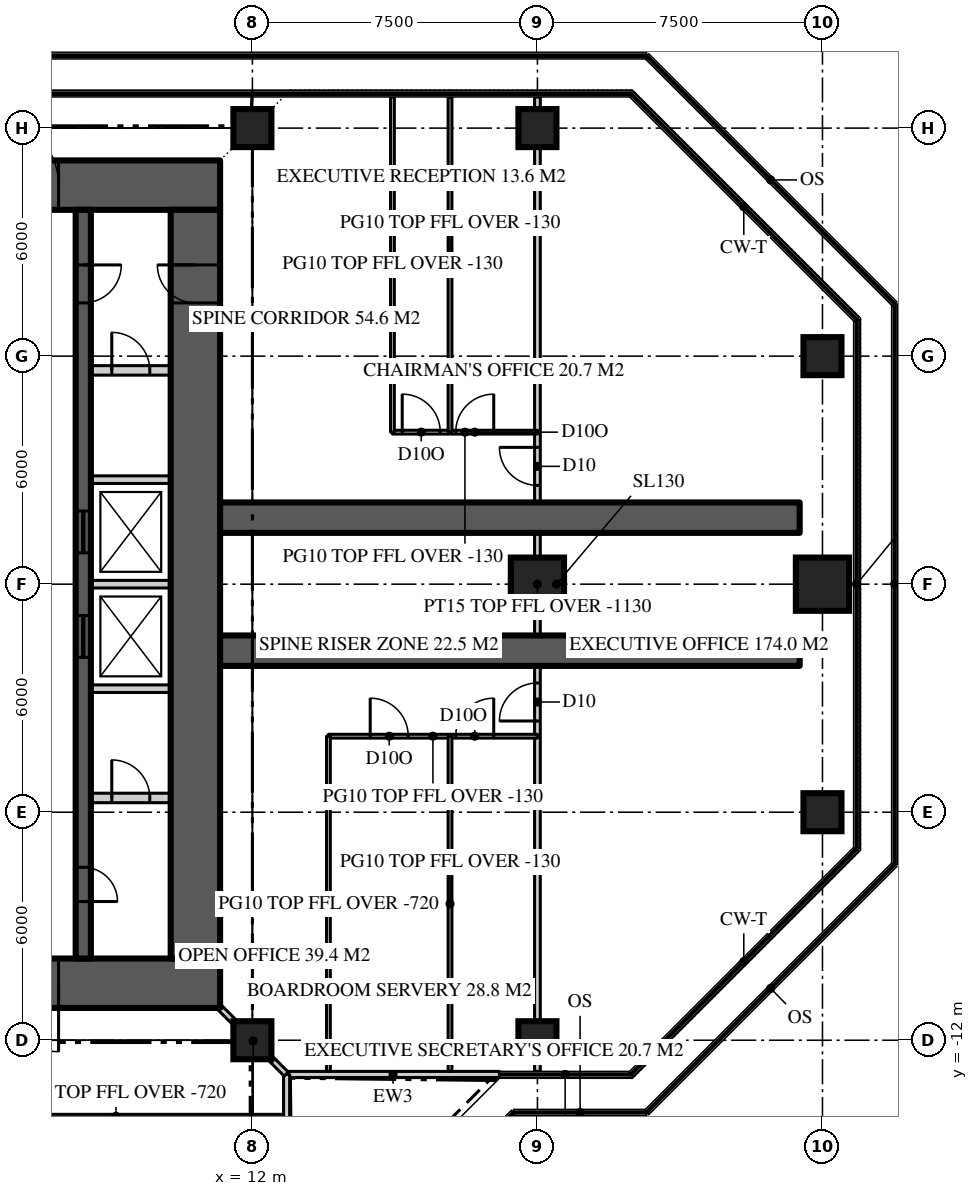
"""IFC4 building model, lengths in metres.
Left out: names, types, materials, properties, quantities, classifications, styles, units other than length and angle.
Written with IfcOpenShell. Run it as: python <this file> out.ifc"""

import sys

from ifc_helpers import new_model, si_unit, direction, frame, frame_2d, origin, origin_2d, place, context, subcontext, project, spatial, rectangle, extrude, element, fill, save


model = new_model("IFC4")
c1 = context("Model", 3, precision=1e-05, world=origin(), true_north=direction((0.0, 1.0)))
c2 = subcontext(c1, "Body", "Model", "MODEL_VIEW")
j1 = project(units=[si_unit("LENGTHUNIT", "METRE"), si_unit("PLANEANGLEUNIT", "RADIAN")], contexts=[c1])
p1 = place(None, origin())
s1 = spatial("IfcSite", under=j1, at=p1, CompositionType="ELEMENT")
p2 = place(p1, origin())
s2 = spatial("IfcBuilding", under=s1, at=p2, CompositionType="ELEMENT")
p3 = place(p2, frame((0.0, 0.0, 290.7)))
s3 = spatial("IfcBuildingStorey", under=s2, at=p3, CompositionType="ELEMENT", Elevation=290.7)
p4 = place(p3, frame((-11.15, 10.5, 0.0), z_axis=(0.0, 0.0, 1.0), x_axis=(1.0, 0.0, 0.0)))
e1 = element("IfcWall", 1, at=p4, inside=s3, PredefinedType="SHEAR", context=c2, shape_type="SweptSolid", body=[
    extrude(rectangle(XDim=22.3, YDim=1.3, at=frame_2d((11.15, 0.0))), origin(), (0.0, 0.0, 1.0), 3.9),
])
p5 = place(p4, frame((4.25, 0.0, 0.0)))
e2 = element("IfcOpeningElement", 2, at=p5, cuts=e1, PredefinedType="OPENING", context=c2, shape_type="SweptSolid", body=[
    extrude(rectangle(XDim=1.8, YDim=2.2, at=frame_2d((0.9, 1.1))), frame((0.0, 0.66, 0.0), z_axis=(0.0, -1.0, 0.0), x_axis=(1.0, 0.0, 0.0)), (0.0, 0.0, 1.0), 1.32),
])
p6 = place(p4, frame((16.25, 0.0, 0.0)))
e3 = element("IfcOpeningElement", 3, at=p6, cuts=e1, PredefinedType="OPENING", context=c2, shape_type="SweptSolid", body=[
    extrude(rectangle(XDim=1.8, YDim=2.2, at=frame_2d((0.9, 1.1))), frame((0.0, 0.66, 0.0), z_axis=(0.0, -1.0, 0.0), x_axis=(1.0, 0.0, 0.0)), (0.0, 0.0, 1.0), 1.32),
])
p7 = place(p3, frame((11.15, -10.5, 0.0), z_axis=(0.0, 0.0, 1.0), x_axis=(-1.0, 0.0, 0.0)))
e4 = element("IfcWall", 4, at=p7, inside=s3, PredefinedType="SHEAR", context=c2, shape_type="SweptSolid", body=[
    extrude(rectangle(XDim=22.3, YDim=1.3, at=frame_2d((11.15, 0.0))), origin(), (0.0, 0.0, 1.0), 3.9),
])
p8 = place(p7, frame((16.25, 0.0, 0.0)))
e5 = element("IfcOpeningElement", 5, at=p8, cuts=e4, PredefinedType="OPENING", context=c2, shape_type="SweptSolid", body=[
    extrude(rectangle(XDim=1.8, YDim=2.2, at=frame_2d((0.9, 1.1))), frame((0.0, 0.66, 0.0), z_axis=(0.0, -1.0, 0.0), x_axis=(1.0, 0.0, 0.0)), (0.0, 0.0, 1.0), 1.32),
])
p9 = place(p7, frame((4.25, 0.0, 0.0)))
e6 = element("IfcOpeningElement", 6, at=p9, cuts=e4, PredefinedType="OPENING", context=c2, shape_type="SweptSolid", body=[
    extrude(rectangle(XDim=1.8, YDim=2.2, at=frame_2d((0.9, 1.1))), frame((0.0, 0.66, 0.0), z_axis=(0.0, -1.0, 0.0), x_axis=(1.0, 0.0, 0.0)), (0.0, 0.0, 1.0), 1.32),
])
p10 = place(p3, frame((10.5, -9.85, 0.0), z_axis=(0.0, 0.0, 1.0), x_axis=(0.0, 1.0, 0.0)))
e7 = element("IfcWall", 7, at=p10, inside=s3, PredefinedType="SHEAR", context=c2, shape_type="SweptSolid", body=[
    extrude(rectangle(XDim=19.7, YDim=1.3, at=frame_2d((9.85, 0.0))), origin(), (0.0, 0.0, 1.0), 3.9),
])
p11 = place(p10, frame((17.25, 0.0, 0.0)))
e8 = element("IfcOpeningElement", 8, at=p11, cuts=e7, PredefinedType="OPENING", context=c2, shape_type="SweptSolid", body=[
    extrude(rectangle(XDim=1.0, YDim=2.2, at=frame_2d((0.5, 1.1))), frame((0.0, 0.66, 0.0), z_axis=(0.0, -1.0, 0.0), x_axis=(1.0, 0.0, 0.0)), (0.0, 0.0, 1.0), 1.32),
])
for number, where, z_axis, x_axis in (
    (9, (11.15, -1.75, 0.0), (0.0, 0.0, 1.0), (1.0, 0.0, 0.0)),
    (10, (11.15, 1.75, 0.0), (0.0, 0.0, 1.0), (1.0, 0.0, 0.0)),
):
    element("IfcWall", number, at=place(p3, frame(where, z_axis=z_axis, x_axis=x_axis)), inside=s3, PredefinedType="SHEAR", context=c2, shape_type="SweptSolid", body=[
        extrude(rectangle(XDim=15.25, YDim=0.8, at=frame_2d((7.625, 0.0))), origin(), (0.0, 0.0, 1.0), 3.9),
    ])
for number, where, z_axis, x_axis in (
    (11, (12.0, -12.0, 0.0), (0.0, 0.0, 1.0), (1.0, 0.0, 0.0)),
    (12, (19.5, -12.0, 0.0), (0.0, 0.0, 1.0), (1.0, 0.0, 0.0)),
    (13, (27.0, -6.0, 0.0), (0.0, 0.0, 1.0), (1.0, 0.0, 0.0)),
):
    element("IfcColumn", number, at=place(p3, frame(where, z_axis=z_axis, x_axis=x_axis)), inside=s3, PredefinedType="COLUMN", context=c2, shape_type="SweptSolid", body=[
        extrude(rectangle(XDim=1.0, YDim=1.0, at=origin_2d()), origin(), (0.0, 0.0, 1.0), 3.9),
    ])
for number, where, z_axis, x_axis in (
    (14, (19.5, 0.0, 0.0), (0.0, 0.0, 1.0), (1.0, 0.0, 0.0)),
    (15, (27.0, 0.0, 0.0), (0.0, 0.0, 1.0), (1.0, 0.0, 0.0)),
):
    element("IfcColumn", number, at=place(p3, frame(where, z_axis=z_axis, x_axis=x_axis)), inside=s3, PredefinedType="COLUMN", context=c2, shape_type="SweptSolid", body=[
        extrude(rectangle(XDim=1.4, YDim=1.4, at=origin_2d()), origin(), (0.0, 0.0, 1.0), 3.9),
    ])
for number, where, z_axis, x_axis in (
    (16, (27.0, 6.0, 0.0), (0.0, 0.0, 1.0), (1.0, 0.0, 0.0)),
    (17, (12.0, 12.0, 0.0), (0.0, 0.0, 1.0), (1.0, 0.0, 0.0)),
    (18, (19.5, 12.0, 0.0), (0.0, 0.0, 1.0), (1.0, 0.0, 0.0)),
):
    element("IfcColumn", number, at=place(p3, frame(where, z_axis=z_axis, x_axis=x_axis)), inside=s3, PredefinedType="COLUMN", context=c2, shape_type="SweptSolid", body=[
        extrude(rectangle(XDim=1.0, YDim=1.0, at=origin_2d()), origin(), (0.0, 0.0, 1.0), 3.9),
    ])
p12 = place(p3, frame((12.9, -12.9, 0.0), z_axis=(0.0, 0.0, 1.0), x_axis=(1.0, 0.0, 0.0)))
e19 = element("IfcWall", 19, at=p12, inside=s3, PredefinedType="SOLIDWALL", context=c2, shape_type="SweptSolid", body=[
    extrude(rectangle(XDim=5.6, YDim=0.16, at=frame_2d((2.8, 0.0))), origin(), (0.0, 0.0, 1.0), 3.77),
])
p13 = place(p3, frame((12.9, -18.5, 0.0), z_axis=(0.0, 0.0, 1.0), x_axis=(0.0, 1.0, 0.0)))
e20 = element("IfcWall", 20, at=p13, inside=s3, PredefinedType="SOLIDWALL", context=c2, shape_type="SweptSolid", body=[
    extrude(rectangle(XDim=5.6, YDim=0.16, at=frame_2d((2.8, 0.0))), origin(), (0.0, 0.0, 1.0), 3.77),
])
p14 = place(p13, frame((2.3, 0.0, 0.0)))
e21 = element("IfcOpeningElement", 21, at=p14, cuts=e20, PredefinedType="OPENING", context=c2, shape_type="SweptSolid", body=[
    extrude(rectangle(XDim=1.0, YDim=2.2, at=frame_2d((0.5, 1.1))), frame((0.0, 0.09, 0.0), z_axis=(0.0, -1.0, 0.0), x_axis=(1.0, 0.0, 0.0)), (0.0, 0.0, 1.0), 0.18),
])
p15 = place(p3, frame((7.55, 9.85, 0.0), z_axis=(0.0, 0.0, 1.0), x_axis=(0.0, -1.0, 0.0)))
e22 = element("IfcWall", 22, at=p15, inside=s3, PredefinedType="SHEAR", context=c2, shape_type="SweptSolid", body=[
    extrude(rectangle(XDim=19.7, YDim=0.4, at=frame_2d((9.85, 0.0))), origin(), (0.0, 0.0, 1.0), 3.9),
])
p16 = place(p15, frame((1.45, 0.0, 0.0)))
e23 = element("IfcOpeningElement", 23, at=p16, cuts=e22, PredefinedType="OPENING", context=c2, shape_type="SweptSolid", body=[
    extrude(rectangle(XDim=1.0, YDim=2.2, at=frame_2d((0.5, 1.1))), frame((0.0, 0.21, 0.0), z_axis=(0.0, -1.0, 0.0), x_axis=(1.0, 0.0, 0.0)), (0.0, 0.0, 1.0), 0.42),
])
p17 = place(p15, frame((17.3, 0.0, 0.0)))
e24 = element("IfcOpeningElement", 24, at=p17, cuts=e22, PredefinedType="OPENING", context=c2, shape_type="SweptSolid", body=[
    extrude(rectangle(XDim=0.9, YDim=2.1, at=frame_2d((0.45, 1.05))), frame((0.0, 0.21, 0.0), z_axis=(0.0, -1.0, 0.0), x_axis=(1.0, 0.0, 0.0)), (0.0, 0.0, 1.0), 0.42),
])
p18 = place(p15, frame((7.925, 0.0, 0.0)))
e25 = element("IfcOpeningElement", 25, at=p18, cuts=e22, PredefinedType="OPENING", context=c2, shape_type="SweptSolid", body=[
    extrude(rectangle(XDim=1.1, YDim=2.2, at=frame_2d((0.55, 1.1))), frame((0.0, 0.21, 0.0), z_axis=(0.0, -1.0, 0.0), x_axis=(1.0, 0.0, 0.0)), (0.0, 0.0, 1.0), 0.42),
])
p19 = place(p15, frame((10.675, 0.0, 0.0)))
e26 = element("IfcOpeningElement", 26, at=p19, cuts=e22, PredefinedType="OPENING", context=c2, shape_type="SweptSolid", body=[
    extrude(rectangle(XDim=1.1, YDim=2.2, at=frame_2d((0.55, 1.1))), frame((0.0, 0.21, 0.0), z_axis=(0.0, -1.0, 0.0), x_axis=(1.0, 0.0, 0.0)), (0.0, 0.0, 1.0), 0.42),
])
p20 = place(p3, frame((7.75, 5.625, 0.0), z_axis=(0.0, 0.0, 1.0), x_axis=(1.0, 0.0, 0.0)))
e27 = element("IfcWall", 27, at=p20, inside=s3, PredefinedType="SOLIDWALL", context=c2, shape_type="SweptSolid", body=[
    extrude(rectangle(XDim=2.1, YDim=0.25, at=frame_2d((1.05, 0.0))), origin(), (0.0, 0.0, 1.0), 3.7),
])
p21 = place(p20, frame((0.55, 0.0, 0.0)))
e28 = element("IfcOpeningElement", 28, at=p21, cuts=e27, PredefinedType="OPENING", context=c2, shape_type="SweptSolid", body=[
    extrude(rectangle(XDim=1.0, YDim=2.2, at=frame_2d((0.5, 1.1))), frame((0.0, 0.135, 0.0), z_axis=(0.0, -1.0, 0.0), x_axis=(1.0, 0.0, 0.0)), (0.0, 0.0, 1.0), 0.27),
])
p22 = place(p3, frame((7.75, -5.625, 0.0), z_axis=(0.0, 0.0, 1.0), x_axis=(1.0, 0.0, 0.0)))
e29 = element("IfcWall", 29, at=p22, inside=s3, PredefinedType="SOLIDWALL", context=c2, shape_type="SweptSolid", body=[
    extrude(rectangle(XDim=2.1, YDim=0.25, at=frame_2d((1.05, 0.0))), origin(), (0.0, 0.0, 1.0), 3.7),
])
p23 = place(p22, frame((0.55, 0.0, 0.0)))
e30 = element("IfcOpeningElement", 30, at=p23, cuts=e29, PredefinedType="OPENING", context=c2, shape_type="SweptSolid", body=[
    extrude(rectangle(XDim=1.0, YDim=2.2, at=frame_2d((0.5, 1.1))), frame((0.0, 0.135, 0.0), z_axis=(0.0, -1.0, 0.0), x_axis=(1.0, 0.0, 0.0)), (0.0, 0.0, 1.0), 0.27),
])
for number, where, z_axis, x_axis in (
    (31, (7.75, -2.75, 0.0), (0.0, 0.0, 1.0), (1.0, 0.0, 0.0)),
    (32, (7.75, 0.0, 0.0), (0.0, 0.0, 1.0), (1.0, 0.0, 0.0)),
    (33, (7.75, 2.75, 0.0), (0.0, 0.0, 1.0), (1.0, 0.0, 0.0)),
):
    element("IfcWall", number, at=place(p3, frame(where, z_axis=z_axis, x_axis=x_axis)), inside=s3, PredefinedType="SOLIDWALL", context=c2, shape_type="SweptSolid", body=[
        extrude(rectangle(XDim=2.1, YDim=0.2, at=frame_2d((1.05, 0.0))), origin(), (0.0, 0.0, 1.0), 3.7),
    ])
p24 = place(p3, frame((19.5, -12.82, 0.0), z_axis=(0.0, 0.0, 1.0), x_axis=(0.0, 1.0, 0.0)))
e34 = element("IfcWall", 34, at=p24, inside=s3, PredefinedType="PARTITIONING", context=c2, shape_type="SweptSolid", body=[
    extrude(rectangle(XDim=25.64, YDim=0.15, at=frame_2d((12.82, 0.0))), origin(), (0.0, 0.0, 1.0), 2.77),
])
p25 = place(p24, frame((15.42, 0.0, 0.0)))
e35 = element("IfcOpeningElement", 35, at=p25, cuts=e34, PredefinedType="OPENING", context=c2, shape_type="SweptSolid", body=[
    extrude(rectangle(XDim=1.0, YDim=2.2, at=frame_2d((0.5, 1.1))), frame((0.0, 0.085, 0.0), z_axis=(0.0, -1.0, 0.0), x_axis=(1.0, 0.0, 0.0)), (0.0, 0.0, 1.0), 0.17),
])
p26 = place(p24, frame((9.22, 0.0, 0.0)))
e36 = element("IfcOpeningElement", 36, at=p26, cuts=e34, PredefinedType="OPENING", context=c2, shape_type="SweptSolid", body=[
    extrude(rectangle(XDim=1.0, YDim=2.2, at=frame_2d((0.5, 1.1))), frame((0.0, 0.085, 0.0), z_axis=(0.0, -1.0, 0.0), x_axis=(1.0, 0.0, 0.0)), (0.0, 0.0, 1.0), 0.17),
])
p27 = place(p3, frame((15.685, 4.0, 0.0), z_axis=(0.0, 0.0, 1.0), x_axis=(1.0, 0.0, 0.0)))
e37 = element("IfcWall", 37, at=p27, inside=s3, PredefinedType="PARTITIONING", context=c2, shape_type="SweptSolid", body=[
    extrude(rectangle(XDim=3.815, YDim=0.1, at=frame_2d((1.907, 0.0))), origin(), (0.0, 0.0, 1.0), 3.77),
])
p28 = place(p27, frame((0.258, 0.0, 0.0)))
e38 = element("IfcOpeningElement", 38, at=p28, cuts=e37, PredefinedType="OPENING", context=c2, shape_type="SweptSolid", body=[
    extrude(rectangle(XDim=1.0, YDim=2.2, at=frame_2d((0.5, 1.1))), frame((0.0, 0.06, 0.0), z_axis=(0.0, -1.0, 0.0), x_axis=(1.0, 0.0, 0.0)), (0.0, 0.0, 1.0), 0.12),
])
p29 = place(p27, frame((1.665, 0.0, 0.0)))
e39 = element("IfcOpeningElement", 39, at=p29, cuts=e37, PredefinedType="OPENING", context=c2, shape_type="SweptSolid", body=[
    extrude(rectangle(XDim=1.0, YDim=2.2, at=frame_2d((0.5, 1.1))), frame((0.0, 0.06, 0.0), z_axis=(0.0, -1.0, 0.0), x_axis=(1.0, 0.0, 0.0)), (0.0, 0.0, 1.0), 0.12),
])
for number, where, z_axis, x_axis in (
    (40, (15.685, 4.0, 0.0), (0.0, 0.0, 1.0), (0.0, 1.0, 0.0)),
    (41, (17.2, 4.0, 0.0), (0.0, 0.0, 1.0), (0.0, 1.0, 0.0)),
):
    element("IfcWall", number, at=place(p3, frame(where, z_axis=z_axis, x_axis=x_axis)), inside=s3, PredefinedType="PARTITIONING", context=c2, shape_type="SweptSolid", body=[
        extrude(rectangle(XDim=8.82, YDim=0.1, at=frame_2d((4.41, 0.0))), origin(), (0.0, 0.0, 1.0), 3.77),
    ])
p30 = place(p3, frame((14.0, -4.0, 0.0), z_axis=(0.0, 0.0, 1.0), x_axis=(1.0, 0.0, 0.0)))
e42 = element("IfcWall", 42, at=p30, inside=s3, PredefinedType="PARTITIONING", context=c2, shape_type="SweptSolid", body=[
    extrude(rectangle(XDim=5.5, YDim=0.1, at=frame_2d((2.75, 0.0))), origin(), (0.0, 0.0, 1.0), 3.77),
])
p31 = place(p30, frame((1.1, 0.0, 0.0)))
e43 = element("IfcOpeningElement", 43, at=p31, cuts=e42, PredefinedType="OPENING", context=c2, shape_type="SweptSolid", body=[
    extrude(rectangle(XDim=1.0, YDim=2.2, at=frame_2d((0.5, 1.1))), frame((0.0, 0.06, 0.0), z_axis=(0.0, -1.0, 0.0), x_axis=(1.0, 0.0, 0.0)), (0.0, 0.0, 1.0), 0.12),
])
p32 = place(p30, frame((3.35, 0.0, 0.0)))
e44 = element("IfcOpeningElement", 44, at=p32, cuts=e42, PredefinedType="OPENING", context=c2, shape_type="SweptSolid", body=[
    extrude(rectangle(XDim=1.0, YDim=2.2, at=frame_2d((0.5, 1.1))), frame((0.0, 0.06, 0.0), z_axis=(0.0, -1.0, 0.0), x_axis=(1.0, 0.0, 0.0)), (0.0, 0.0, 1.0), 0.12),
])
p33 = place(p3, frame((14.0, -4.0, 0.0), z_axis=(0.0, 0.0, 1.0), x_axis=(0.0, -1.0, 0.0)))
e45 = element("IfcWall", 45, at=p33, inside=s3, PredefinedType="PARTITIONING", context=c2, shape_type="SweptSolid", body=[
    extrude(rectangle(XDim=8.82, YDim=0.1, at=frame_2d((4.41, 0.0))), origin(), (0.0, 0.0, 1.0), 3.18),
])
p34 = place(p3, frame((17.2, -4.0, 0.0), z_axis=(0.0, 0.0, 1.0), x_axis=(0.0, -1.0, 0.0)))
e46 = element("IfcWall", 46, at=p34, inside=s3, PredefinedType="PARTITIONING", context=c2, shape_type="SweptSolid", body=[
    extrude(rectangle(XDim=8.82, YDim=0.1, at=frame_2d((4.41, 0.0))), origin(), (0.0, 0.0, 1.0), 3.77),
])
p35 = place(p3, frame((4.0, -14.0, 0.0), z_axis=(0.0, 0.0, 1.0), x_axis=(1.0, 0.0, 0.0)))
e47 = element("IfcWall", 47, at=p35, inside=s3, PredefinedType="PARTITIONING", context=c2, shape_type="SweptSolid", body=[
    extrude(rectangle(XDim=8.82, YDim=0.1, at=frame_2d((4.41, 0.0))), origin(), (0.0, 0.0, 1.0), 3.18),
])
p36 = place(p3, frame((11.15, -11.15, 0.0), z_axis=(0.0, 0.0, 1.0), x_axis=(0.707106781187, -0.707106781187, 0.0)))
e48 = element("IfcWall", 48, at=p36, inside=s3, PredefinedType="PARTITIONING", context=c2, shape_type="SweptSolid", body=[
    extrude(rectangle(XDim=2.461, YDim=0.15, at=frame_2d((1.23, 0.0))), origin(), (0.0, 0.0, 1.0), 3.22),
])
p37 = place(p6, origin())
e49 = element("IfcDoor", 49, at=p37, inside=s3, OperationType="DOUBLE_DOOR_DOUBLE_SWING", PredefinedType="DOOR", context=c2, shape_type="SweptSolid", body=[
    extrude(rectangle(XDim=1.8, YDim=2.2, at=frame_2d((0.9, 1.1))), frame((0.0, 0.025, 0.0), z_axis=(0.0, -1.0, 0.0), x_axis=(1.0, 0.0, 0.0)), (0.0, 0.0, 1.0), 0.05),
])
fill(e3, e49)
p38 = place(p9, origin())
e50 = element("IfcDoor", 50, at=p38, inside=s3, OperationType="DOUBLE_DOOR_DOUBLE_SWING", PredefinedType="DOOR", context=c2, shape_type="SweptSolid", body=[
    extrude(rectangle(XDim=1.8, YDim=2.2, at=frame_2d((0.9, 1.1))), frame((0.0, 0.025, 0.0), z_axis=(0.0, -1.0, 0.0), x_axis=(1.0, 0.0, 0.0)), (0.0, 0.0, 1.0), 0.05),
])
fill(e6, e50)
p39 = place(p16, origin())
e51 = element("IfcDoor", 51, at=p39, inside=s3, OperationType="SINGLE_SWING_LEFT", PredefinedType="DOOR", context=c2, shape_type="SweptSolid", body=[
    extrude(rectangle(XDim=1.0, YDim=2.2, at=frame_2d((0.5, 1.1))), frame((0.0, 0.025, 0.0), z_axis=(0.0, -1.0, 0.0), x_axis=(1.0, 0.0, 0.0)), (0.0, 0.0, 1.0), 0.05),
])
fill(e23, e51)
p40 = place(p11, origin())
e52 = element("IfcDoor", 52, at=p40, inside=s3, OperationType="SINGLE_SWING_RIGHT", PredefinedType="DOOR", context=c2, shape_type="SweptSolid", body=[
    extrude(rectangle(XDim=1.0, YDim=2.2, at=frame_2d((0.5, 1.1))), frame((0.0, 0.025, 0.0), z_axis=(0.0, -1.0, 0.0), x_axis=(1.0, 0.0, 0.0)), (0.0, 0.0, 1.0), 0.05),
])
fill(e8, e52)
p41 = place(p17, origin())
e53 = element("IfcDoor", 53, at=p41, inside=s3, OperationType="SINGLE_SWING_RIGHT", PredefinedType="DOOR", context=c2, shape_type="SweptSolid", body=[
    extrude(rectangle(XDim=0.9, YDim=2.1, at=frame_2d((0.45, 1.05))), frame((0.0, 0.025, 0.0), z_axis=(0.0, -1.0, 0.0), x_axis=(1.0, 0.0, 0.0)), (0.0, 0.0, 1.0), 0.05),
])
fill(e24, e53)
p42 = place(p18, origin())
e54 = element("IfcDoor", 54, at=p42, inside=s3, OperationType="SLIDING_TO_LEFT", PredefinedType="DOOR", context=c2, shape_type="SweptSolid", body=[
    extrude(rectangle(XDim=1.1, YDim=2.2, at=frame_2d((0.55, 1.1))), frame((0.0, 0.025, 0.0), z_axis=(0.0, -1.0, 0.0), x_axis=(1.0, 0.0, 0.0)), (0.0, 0.0, 1.0), 0.05),
])
fill(e25, e54)
p43 = place(p19, origin())
e55 = element("IfcDoor", 55, at=p43, inside=s3, OperationType="SLIDING_TO_LEFT", PredefinedType="DOOR", context=c2, shape_type="SweptSolid", body=[
    extrude(rectangle(XDim=1.1, YDim=2.2, at=frame_2d((0.55, 1.1))), frame((0.0, 0.025, 0.0), z_axis=(0.0, -1.0, 0.0), x_axis=(1.0, 0.0, 0.0)), (0.0, 0.0, 1.0), 0.05),
])
fill(e26, e55)
p44 = place(p25, origin())
e56 = element("IfcDoor", 56, at=p44, inside=s3, OperationType="SINGLE_SWING_RIGHT", PredefinedType="DOOR", context=c2, shape_type="SweptSolid", body=[
    extrude(rectangle(XDim=1.0, YDim=2.2, at=frame_2d((0.5, 1.1))), frame((0.0, 0.025, 0.0), z_axis=(0.0, -1.0, 0.0), x_axis=(1.0, 0.0, 0.0)), (0.0, 0.0, 1.0), 0.05),
])
fill(e35, e56)
p45 = place(p26, origin())
e57 = element("IfcDoor", 57, at=p45, inside=s3, OperationType="SINGLE_SWING_LEFT", PredefinedType="DOOR", context=c2, shape_type="SweptSolid", body=[
    extrude(rectangle(XDim=1.0, YDim=2.2, at=frame_2d((0.5, 1.1))), frame((0.0, 0.025, 0.0), z_axis=(0.0, -1.0, 0.0), x_axis=(1.0, 0.0, 0.0)), (0.0, 0.0, 1.0), 0.05),
])
fill(e36, e57)
p46 = place(p28, origin())
e58 = element("IfcDoor", 58, at=p46, inside=s3, OperationType="SINGLE_SWING_LEFT", PredefinedType="DOOR", context=c2, shape_type="SweptSolid", body=[
    extrude(rectangle(XDim=1.0, YDim=2.2, at=frame_2d((0.5, 1.1))), frame((0.0, 0.025, 0.0), z_axis=(0.0, -1.0, 0.0), x_axis=(1.0, 0.0, 0.0)), (0.0, 0.0, 1.0), 0.05),
])
fill(e38, e58)
p47 = place(p29, origin())
e59 = element("IfcDoor", 59, at=p47, inside=s3, OperationType="SINGLE_SWING_RIGHT", PredefinedType="DOOR", context=c2, shape_type="SweptSolid", body=[
    extrude(rectangle(XDim=1.0, YDim=2.2, at=frame_2d((0.5, 1.1))), frame((0.0, 0.025, 0.0), z_axis=(0.0, -1.0, 0.0), x_axis=(1.0, 0.0, 0.0)), (0.0, 0.0, 1.0), 0.05),
])
fill(e39, e59)
p48 = place(p31, origin())
e60 = element("IfcDoor", 60, at=p48, inside=s3, OperationType="SINGLE_SWING_LEFT", PredefinedType="DOOR", context=c2, shape_type="SweptSolid", body=[
    extrude(rectangle(XDim=1.0, YDim=2.2, at=frame_2d((0.5, 1.1))), frame((0.0, 0.025, 0.0), z_axis=(0.0, -1.0, 0.0), x_axis=(1.0, 0.0, 0.0)), (0.0, 0.0, 1.0), 0.05),
])
fill(e43, e60)
p49 = place(p32, origin())
e61 = element("IfcDoor", 61, at=p49, inside=s3, OperationType="SINGLE_SWING_RIGHT", PredefinedType="DOOR", context=c2, shape_type="SweptSolid", body=[
    extrude(rectangle(XDim=1.0, YDim=2.2, at=frame_2d((0.5, 1.1))), frame((0.0, 0.025, 0.0), z_axis=(0.0, -1.0, 0.0), x_axis=(1.0, 0.0, 0.0)), (0.0, 0.0, 1.0), 0.05),
])
fill(e44, e61)
p50 = place(p21, origin())
e62 = element("IfcDoor", 62, at=p50, inside=s3, OperationType="SINGLE_SWING_LEFT", PredefinedType="DOOR", context=c2, shape_type="SweptSolid", body=[
    extrude(rectangle(XDim=1.0, YDim=2.2, at=frame_2d((0.5, 1.1))), frame((0.0, 0.025, 0.0), z_axis=(0.0, -1.0, 0.0), x_axis=(1.0, 0.0, 0.0)), (0.0, 0.0, 1.0), 0.05),
])
fill(e28, e62)
p51 = place(p23, origin())
e63 = element("IfcDoor", 63, at=p51, inside=s3, OperationType="SINGLE_SWING_LEFT", PredefinedType="DOOR", context=c2, shape_type="SweptSolid", body=[
    extrude(rectangle(XDim=1.0, YDim=2.2, at=frame_2d((0.5, 1.1))), frame((0.0, 0.025, 0.0), z_axis=(0.0, -1.0, 0.0), x_axis=(1.0, 0.0, 0.0)), (0.0, 0.0, 1.0), 0.05),
])
fill(e30, e63)
save(model, sys.argv[1])
